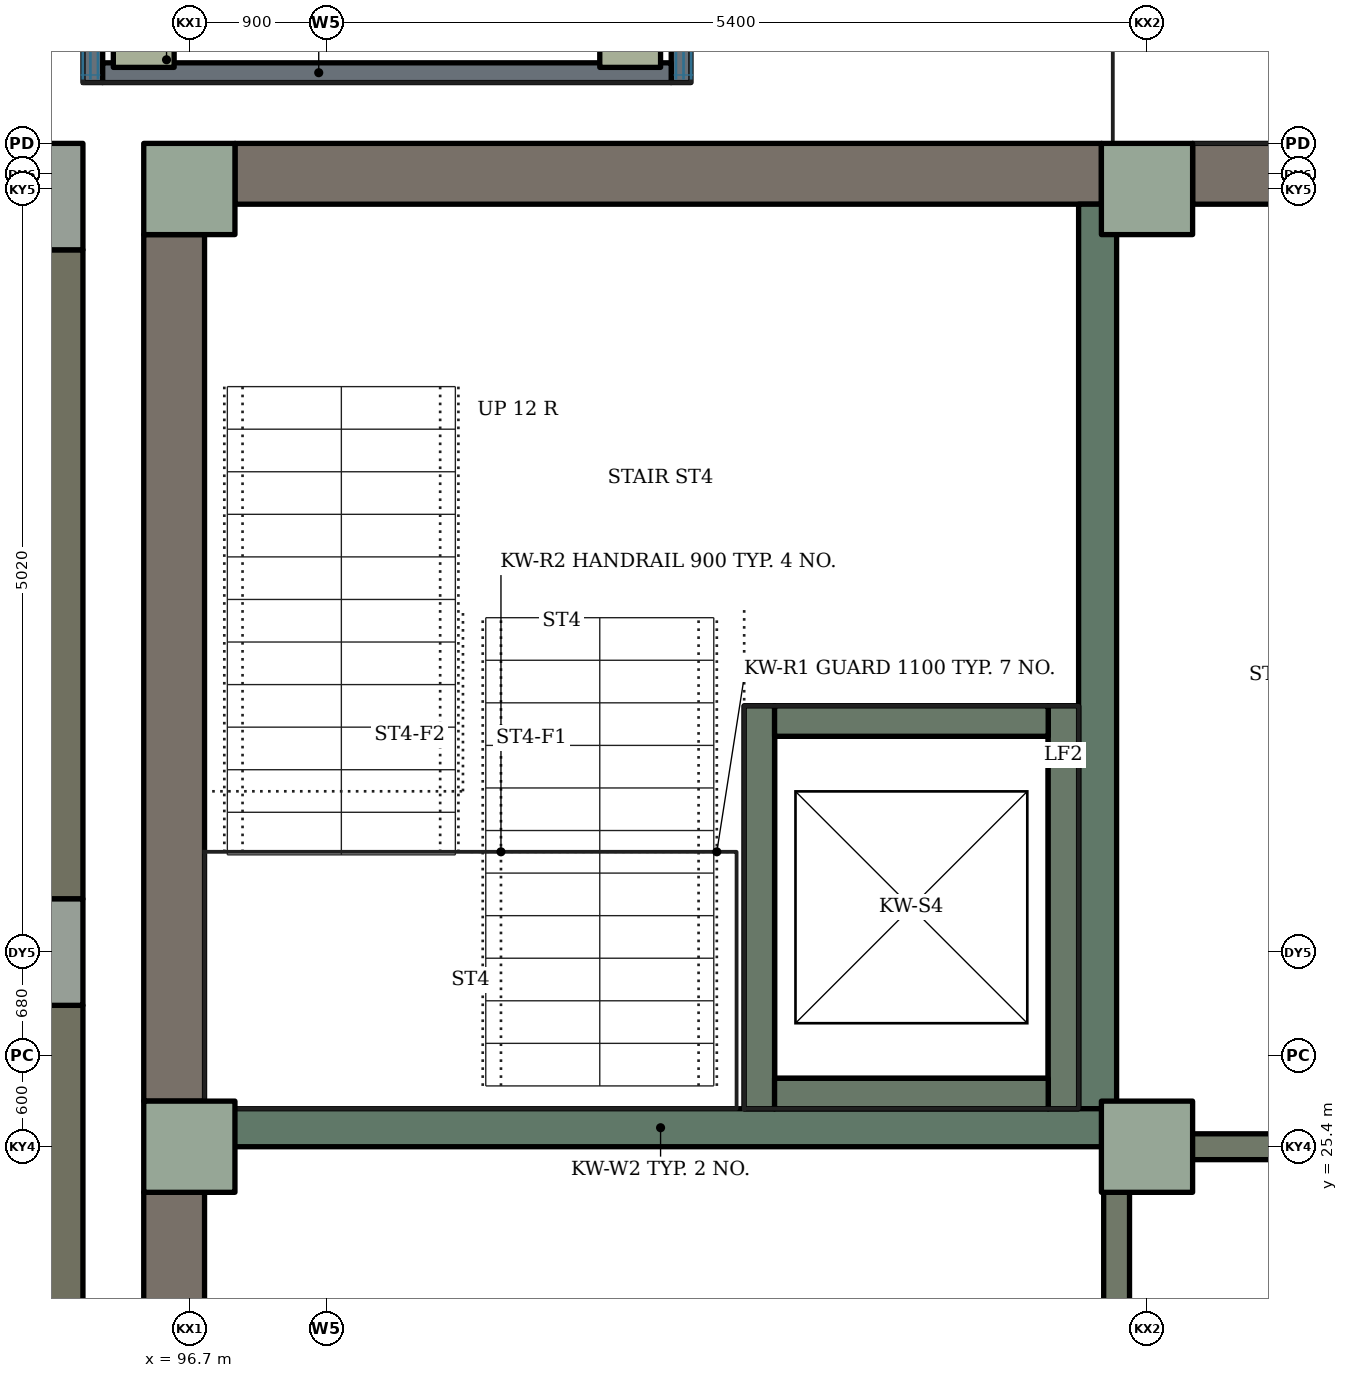
"""IFC4 building model, lengths in metres.
Left out: names, types, materials, properties, quantities, classifications, styles, units other than length and angle.
Written with IfcOpenShell. Run it as: python <this file> out.ifc"""

import sys

from ifc_helpers import new_model, si_unit, direction, frame, frame_2d, origin, origin_2d, place, context, subcontext, project, spatial, rectangle, extrude, element, fill, save


model = new_model("IFC4")
c1 = context("Model", 3, precision=1e-05, world=origin(), true_north=direction((0.0, 1.0)))
c2 = subcontext(c1, "Body", "Model", "MODEL_VIEW")
j1 = project(units=[si_unit("LENGTHUNIT", "METRE"), si_unit("PLANEANGLEUNIT", "RADIAN")], contexts=[c1])
p1 = place(None, origin())
s1 = spatial("IfcSite", under=j1, at=p1, CompositionType="ELEMENT")
p2 = place(p1, origin())
s2 = spatial("IfcBuilding", under=s1, at=p2, CompositionType="ELEMENT")
p3 = place(p2, origin())
s3 = spatial("IfcBuildingStorey", under=s2, at=p3, CompositionType="ELEMENT", Elevation=0.0)
for number, where, z_axis, x_axis in (
    (1, (95.65, 31.65, 0.0), (0.0, 0.0, 1.0), (1.0, 0.0, 0.0)),
    (2, (95.65, 26.68, 0.0), (0.0, 0.0, 1.0), (1.0, 0.0, 0.0)),
):
    element("IfcColumn", number, at=place(p3, frame(where, z_axis=z_axis, x_axis=x_axis)), inside=s3, PredefinedType="COLUMN", context=c2, shape_type="SweptSolid", body=[
        extrude(rectangle(XDim=0.7, YDim=0.7, at=origin_2d()), origin(), (0.0, 0.0, 1.0), 4.2),
    ])
p4 = place(p3, frame((95.8, 21.91, 0.0), z_axis=(0.0, 0.0, 1.0), x_axis=(0.0, 1.0, 0.0)))
e3 = element("IfcWall", 3, at=p4, inside=s3, PredefinedType="SOLIDWALL", context=c2, shape_type="SweptSolid", body=[
    extrude(rectangle(XDim=4.42, YDim=0.4, at=frame_2d((2.21, 0.0))), origin(), (0.0, 0.0, 1.0), 4.2),
])
p5 = place(p4, frame((1.71, 0.0, 0.9)))
e4 = element("IfcOpeningElement", 4, at=p5, cuts=e3, PredefinedType="OPENING", context=c2, shape_type="SweptSolid", body=[
    extrude(rectangle(XDim=1.0, YDim=2.4, at=frame_2d((0.5, 1.2))), frame((0.0, 0.21, 0.0), z_axis=(0.0, -1.0, 0.0), x_axis=(1.0, 0.0, 0.0)), (0.0, 0.0, 1.0), 0.42),
])
p6 = place(p3, frame((95.8, 27.03, 0.0), z_axis=(0.0, 0.0, 1.0), x_axis=(0.0, 1.0, 0.0)))
e5 = element("IfcWall", 5, at=p6, inside=s3, PredefinedType="SOLIDWALL", context=c2, shape_type="SweptSolid", body=[
    extrude(rectangle(XDim=4.27, YDim=0.4, at=frame_2d((2.135, 0.0))), origin(), (0.0, 0.0, 1.0), 4.2),
])
p7 = place(p6, frame((1.635, 0.0, 0.9)))
e6 = element("IfcOpeningElement", 6, at=p7, cuts=e5, PredefinedType="OPENING", context=c2, shape_type="SweptSolid", body=[
    extrude(rectangle(XDim=1.0, YDim=2.4, at=frame_2d((0.5, 1.2))), frame((0.0, 0.21, 0.0), z_axis=(0.0, -1.0, 0.0), x_axis=(1.0, 0.0, 0.0)), (0.0, 0.0, 1.0), 0.42),
])
for number, where, z_axis, x_axis in (
    (7, (96.7, 25.4, 0.0), (0.0, 0.0, 1.0), (1.0, 0.0, 0.0)),
    (8, (96.7, 31.7, 0.0), (0.0, 0.0, 1.0), (1.0, 0.0, 0.0)),
    (9, (103.0, 25.4, 0.0), (0.0, 0.0, 1.0), (1.0, 0.0, 0.0)),
    (10, (103.0, 31.7, 0.0), (0.0, 0.0, 1.0), (1.0, 0.0, 0.0)),
):
    element("IfcColumn", number, at=place(p3, frame(where, z_axis=z_axis, x_axis=x_axis)), inside=s3, PredefinedType="COLUMN", context=c2, shape_type="SweptSolid", body=[
        extrude(rectangle(XDim=0.6, YDim=0.6, at=origin_2d()), origin(), (0.0, 0.0, 1.0), 4.2),
    ])
p8 = place(p3, frame((97.0, 31.8, 0.0), z_axis=(0.0, 0.0, 1.0), x_axis=(1.0, 0.0, 0.0)))
e11 = element("IfcWall", 11, at=p8, inside=s3, PredefinedType="SOLIDWALL", context=c2, shape_type="SweptSolid", body=[
    extrude(rectangle(XDim=5.7, YDim=0.4, at=frame_2d((2.85, 0.0))), origin(), (0.0, 0.0, 1.0), 4.2),
])
p9 = place(p8, frame((1.5, 0.0, 0.0)))
e12 = element("IfcOpeningElement", 12, at=p9, cuts=e11, PredefinedType="OPENING", context=c2, shape_type="SweptSolid", body=[
    extrude(rectangle(XDim=1.0, YDim=2.4, at=frame_2d((0.5, 1.2))), frame((0.0, 0.21, 0.0), z_axis=(0.0, -1.0, 0.0), x_axis=(1.0, 0.0, 0.0)), (0.0, 0.0, 1.0), 0.42),
])
p10 = place(p3, frame((103.3, 31.8, 0.0), z_axis=(0.0, 0.0, 1.0), x_axis=(1.0, 0.0, 0.0)))
e13 = element("IfcWall", 13, at=p10, inside=s3, PredefinedType="SOLIDWALL", context=c2, shape_type="SweptSolid", body=[
    extrude(rectangle(XDim=5.8, YDim=0.4, at=frame_2d((2.9, 0.0))), origin(), (0.0, 0.0, 1.0), 4.2),
])
p11 = place(p10, frame((0.925, 0.0, 1.5)))
e14 = element("IfcOpeningElement", 14, at=p11, cuts=e13, PredefinedType="OPENING", context=c2, shape_type="SweptSolid", body=[
    extrude(rectangle(XDim=0.75, YDim=1.2, at=frame_2d((0.375, 0.6))), frame((0.0, 0.21, 0.0), z_axis=(0.0, -1.0, 0.0), x_axis=(1.0, 0.0, 0.0)), (0.0, 0.0, 1.0), 0.42),
])
p12 = place(p3, frame((96.6, 25.1, 0.0), z_axis=(0.0, 0.0, 1.0), x_axis=(0.0, -1.0, 0.0)))
e15 = element("IfcWall", 15, at=p12, inside=s3, PredefinedType="SOLIDWALL", context=c2, shape_type="SweptSolid", body=[
    extrude(rectangle(XDim=5.8, YDim=0.4, at=frame_2d((2.9, 0.0))), origin(), (0.0, 0.0, 1.0), 4.2),
])
p13 = place(p12, frame((4.05, 0.0, 0.0)))
e16 = element("IfcOpeningElement", 16, at=p13, cuts=e15, PredefinedType="OPENING", context=c2, shape_type="SweptSolid", body=[
    extrude(rectangle(XDim=1.5, YDim=2.1, at=frame_2d((0.75, 1.05))), frame((0.0, 0.21, 0.0), z_axis=(0.0, -1.0, 0.0), x_axis=(1.0, 0.0, 0.0)), (0.0, 0.0, 1.0), 0.42),
])
p14 = place(p3, frame((96.6, 31.4, 0.0), z_axis=(0.0, 0.0, 1.0), x_axis=(0.0, -1.0, 0.0)))
e17 = element("IfcWall", 17, at=p14, inside=s3, PredefinedType="SOLIDWALL", context=c2, shape_type="SweptSolid", body=[
    extrude(rectangle(XDim=5.7, YDim=0.4, at=frame_2d((2.85, 0.0))), origin(), (0.0, 0.0, 1.0), 4.2),
])
p15 = place(p3, frame((102.675, 25.65, 0.0), z_axis=(0.0, 0.0, 1.0), x_axis=(0.0, 1.0, 0.0)))
e18 = element("IfcWall", 18, at=p15, inside=s3, PredefinedType="SHEAR", context=c2, shape_type="SweptSolid", body=[
    extrude(rectangle(XDim=5.95, YDim=0.25, at=frame_2d((2.975, 0.0))), origin(), (0.0, 0.0, 1.0), 4.2),
])
p16 = place(p15, frame((4.0, 0.0, 0.0)))
e19 = element("IfcOpeningElement", 19, at=p16, cuts=e18, PredefinedType="OPENING", context=c2, shape_type="SweptSolid", body=[
    extrude(rectangle(XDim=1.0, YDim=2.1, at=frame_2d((0.5, 1.05))), frame((0.0, 0.135, 0.0), z_axis=(0.0, -1.0, 0.0), x_axis=(1.0, 0.0, 0.0)), (0.0, 0.0, 1.0), 0.27),
])
p17 = place(p3, frame((96.8, 25.525, 0.0), z_axis=(0.0, 0.0, 1.0), x_axis=(1.0, 0.0, 0.0)))
e20 = element("IfcWall", 20, at=p17, inside=s3, PredefinedType="SHEAR", context=c2, shape_type="SweptSolid", body=[
    extrude(rectangle(XDim=6.0, YDim=0.25, at=frame_2d((3.0, 0.0))), origin(), (0.0, 0.0, 1.0), 4.2),
])
for number, where, z_axis, x_axis in (
    (21, (100.45, 25.65, 0.0), (0.0, 0.0, 1.0), (0.0, 1.0, 0.0)),
    (22, (102.45, 25.65, 0.0), (0.0, 0.0, 1.0), (0.0, 1.0, 0.0)),
):
    element("IfcWall", number, at=place(p3, frame(where, z_axis=z_axis, x_axis=x_axis)), inside=s3, PredefinedType="SHEAR", context=c2, shape_type="SweptSolid", body=[
        extrude(rectangle(XDim=2.65, YDim=0.2, at=frame_2d((1.325, 0.0))), origin(), (0.0, 0.0, 1.0), 4.2),
    ])
p18 = place(p3, frame((100.55, 25.75, 0.0), z_axis=(0.0, 0.0, 1.0), x_axis=(1.0, 0.0, 0.0)))
e23 = element("IfcWall", 23, at=p18, inside=s3, PredefinedType="SHEAR", context=c2, shape_type="SweptSolid", body=[
    extrude(rectangle(XDim=1.8, YDim=0.2, at=frame_2d((0.9, 0.0))), origin(), (0.0, 0.0, 1.0), 4.2),
])
p19 = place(p3, frame((100.55, 28.2, 0.0), z_axis=(0.0, 0.0, 1.0), x_axis=(1.0, 0.0, 0.0)))
e24 = element("IfcWall", 24, at=p19, inside=s3, PredefinedType="SHEAR", context=c2, shape_type="SweptSolid", body=[
    extrude(rectangle(XDim=1.8, YDim=0.2, at=frame_2d((0.9, 0.0))), origin(), (0.0, 0.0, 1.0), 4.2),
])
p20 = place(p19, frame((0.35, 0.0, 0.0)))
e25 = element("IfcOpeningElement", 25, at=p20, cuts=e24, PredefinedType="OPENING", context=c2, shape_type="SweptSolid", body=[
    extrude(rectangle(XDim=1.1, YDim=2.1, at=frame_2d((0.55, 1.05))), frame((0.0, 0.11, 0.0), z_axis=(0.0, -1.0, 0.0), x_axis=(1.0, 0.0, 0.0)), (0.0, 0.0, 1.0), 0.22),
])
for number, where, z_axis, x_axis in (
    (26, (100.45, 25.65, -1.4), (0.0, 0.0, 1.0), (0.0, 1.0, 0.0)),
    (27, (102.45, 25.65, -1.4), (0.0, 0.0, 1.0), (0.0, 1.0, 0.0)),
):
    element("IfcWall", number, at=place(p3, frame(where, z_axis=z_axis, x_axis=x_axis)), inside=s3, PredefinedType="SHEAR", context=c2, shape_type="SweptSolid", body=[
        extrude(rectangle(XDim=2.65, YDim=0.2, at=frame_2d((1.325, 0.0))), origin(), (0.0, 0.0, 1.0), 1.4),
    ])
for number, where, z_axis, x_axis in (
    (28, (100.55, 25.75, -1.4), (0.0, 0.0, 1.0), (1.0, 0.0, 0.0)),
    (29, (100.55, 28.2, -1.4), (0.0, 0.0, 1.0), (1.0, 0.0, 0.0)),
):
    element("IfcWall", number, at=place(p3, frame(where, z_axis=z_axis, x_axis=x_axis)), inside=s3, PredefinedType="SHEAR", context=c2, shape_type="SweptSolid", body=[
        extrude(rectangle(XDim=1.8, YDim=0.2, at=frame_2d((0.9, 0.0))), origin(), (0.0, 0.0, 1.0), 1.4),
    ])
for number, where, z_axis, x_axis in (
    (30, (96.4, 32.7, 0.0), (0.0, 0.0, 1.0), (1.0, 0.0, 0.0)),
    (31, (99.6, 32.7, 0.0), (0.0, 0.0, 1.0), (1.0, 0.0, 0.0)),
):
    element("IfcColumn", number, at=place(p3, frame(where, z_axis=z_axis, x_axis=x_axis)), inside=s3, PredefinedType="COLUMN", context=c2, shape_type="SweptSolid", body=[
        extrude(rectangle(XDim=0.4, YDim=0.4, at=origin_2d()), origin(), (0.0, 0.0, 1.0), 3.84),
    ])
for number, where, z_axis, x_axis in (
    (32, (96.065, 32.4, 4.0), (0.0, 0.0, 1.0), (0.0, 1.0, 0.0)),
    (33, (99.935, 32.4, 4.0), (0.0, 0.0, 1.0), (0.0, 1.0, 0.0)),
):
    element("IfcWall", number, at=place(p3, frame(where, z_axis=z_axis, x_axis=x_axis)), inside=s3, PredefinedType="PARAPET", context=c2, shape_type="SweptSolid", body=[
        extrude(rectangle(XDim=1.6, YDim=0.13, at=frame_2d((0.8, 0.0))), origin(), (0.0, 0.0, 1.0), 0.45),
    ])
p21 = place(p3, frame((96.13, 32.465, 4.0), z_axis=(0.0, 0.0, 1.0), x_axis=(1.0, 0.0, 0.0)))
e34 = element("IfcWall", 34, at=p21, inside=s3, PredefinedType="PARAPET", context=c2, shape_type="SweptSolid", body=[
    extrude(rectangle(XDim=3.74, YDim=0.13, at=frame_2d((1.87, 0.0))), origin(), (0.0, 0.0, 1.0), 0.45),
])
p22 = place(p3, frame((102.8, 21.4, 0.0), z_axis=(0.0, 0.0, 1.0), x_axis=(0.0, 1.0, 0.0)))
e35 = element("IfcWall", 35, at=p22, inside=s3, PredefinedType="PARTITIONING", context=c2, shape_type="SweptSolid", body=[
    extrude(rectangle(XDim=3.92, YDim=0.17, at=frame_2d((1.96, 0.0))), origin(), (0.0, 0.0, 1.0), 3.92),
])
p23 = place(p3, frame((103.22, 31.6, 0.0), z_axis=(0.0, 0.0, 1.0), x_axis=(-1.0, 0.0, 0.0)))
e36 = element("IfcWall", 36, at=p23, inside=s3, PredefinedType="PARTITIONING", context=c2, shape_type="SweptSolid", body=[
    extrude(rectangle(XDim=0.34, YDim=0.17, at=frame_2d((0.17, 0.0))), origin(), (0.0, 0.0, 1.0), 3.92),
])
p24 = place(p3, frame((106.4, 25.4, 0.0), z_axis=(0.0, 0.0, 1.0), x_axis=(-1.0, 0.0, 0.0)))
e37 = element("IfcWall", 37, at=p24, inside=s3, PredefinedType="PARTITIONING", context=c2, shape_type="SweptSolid", body=[
    extrude(rectangle(XDim=3.52, YDim=0.17, at=frame_2d((1.76, 0.0))), origin(), (0.0, 0.0, 1.0), 3.92),
])
p25 = place(p24, frame((1.15, 0.0, 0.0)))
e38 = element("IfcOpeningElement", 38, at=p25, cuts=e37, PredefinedType="OPENING", context=c2, shape_type="SweptSolid", body=[
    extrude(rectangle(XDim=1.2, YDim=2.1, at=frame_2d((0.6, 1.05))), frame((0.0, 0.095, 0.0), z_axis=(0.0, -1.0, 0.0), x_axis=(1.0, 0.0, 0.0)), (0.0, 0.0, 1.0), 0.19),
])
p26 = place(p5, origin())
e39 = element("IfcWindow", 39, at=p26, inside=s3, PartitioningType="SINGLE_PANEL", PredefinedType="WINDOW", context=c2, shape_type="SweptSolid", body=[
    extrude(rectangle(XDim=1.0, YDim=2.4, at=frame_2d((0.5, 1.2))), frame((0.0, 0.03, 0.0), z_axis=(0.0, -1.0, 0.0), x_axis=(1.0, 0.0, 0.0)), (0.0, 0.0, 1.0), 0.06),
])
fill(e4, e39)
p27 = place(p7, origin())
e40 = element("IfcWindow", 40, at=p27, inside=s3, PartitioningType="SINGLE_PANEL", PredefinedType="WINDOW", context=c2, shape_type="SweptSolid", body=[
    extrude(rectangle(XDim=1.0, YDim=2.4, at=frame_2d((0.5, 1.2))), frame((0.0, 0.03, 0.0), z_axis=(0.0, -1.0, 0.0), x_axis=(1.0, 0.0, 0.0)), (0.0, 0.0, 1.0), 0.06),
])
fill(e6, e40)
p28 = place(p9, origin())
e41 = element("IfcDoor", 41, at=p28, inside=s3, OperationType="SINGLE_SWING_LEFT", PredefinedType="DOOR", context=c2, shape_type="SweptSolid", body=[
    extrude(rectangle(XDim=1.0, YDim=2.4, at=frame_2d((0.5, 1.2))), frame((0.0, 0.025, 0.0), z_axis=(0.0, -1.0, 0.0), x_axis=(1.0, 0.0, 0.0)), (0.0, 0.0, 1.0), 0.05),
])
fill(e12, e41)
p29 = place(p20, origin())
e42 = element("IfcDoor", 42, at=p29, inside=s3, OperationType="SLIDING_TO_LEFT", PredefinedType="DOOR", context=c2, shape_type="SweptSolid", body=[
    extrude(rectangle(XDim=1.1, YDim=2.1, at=frame_2d((0.55, 1.05))), frame((0.0, 0.025, 0.0), z_axis=(0.0, -1.0, 0.0), x_axis=(1.0, 0.0, 0.0)), (0.0, 0.0, 1.0), 0.05),
])
fill(e25, e42)
p30 = place(p16, origin())
e43 = element("IfcDoor", 43, at=p30, inside=s3, OperationType="SINGLE_SWING_LEFT", PredefinedType="DOOR", context=c2, shape_type="SweptSolid", body=[
    extrude(rectangle(XDim=1.0, YDim=2.1, at=frame_2d((0.5, 1.05))), frame((0.0, 0.025, 0.0), z_axis=(0.0, -1.0, 0.0), x_axis=(1.0, 0.0, 0.0)), (0.0, 0.0, 1.0), 0.05),
])
fill(e19, e43)
save(model, sys.argv[1])
